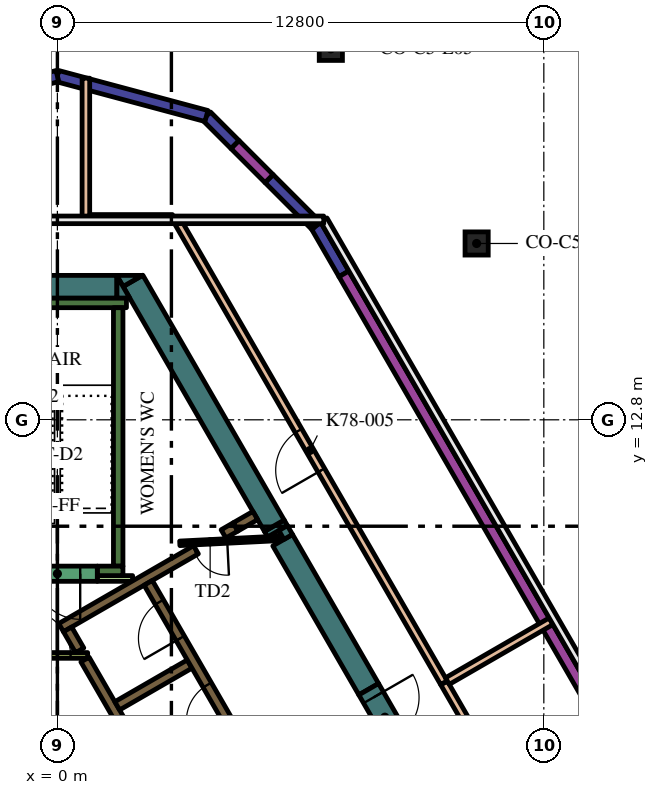
"""IFC4 building model, lengths in metres.
Left out: names, types, materials, properties, quantities, classifications, styles, units other than length and angle.
Written with IfcOpenShell. Run it as: python <this file> out.ifc"""

import sys

from ifc_helpers import new_model, si_unit, direction, frame, frame_2d, origin, origin_2d, place, context, subcontext, project, spatial, polyline, rectangle, hollow_circle, outline, extrude, element, fill, save


model = new_model("IFC4")
c1 = context("Model", 3, precision=1e-05, world=origin(), true_north=direction((0.0, 1.0)))
c2 = subcontext(c1, "Body", "Model", "MODEL_VIEW")
j1 = project(units=[si_unit("LENGTHUNIT", "METRE"), si_unit("PLANEANGLEUNIT", "RADIAN")], contexts=[c1])
p1 = place(None, origin())
s1 = spatial("IfcSite", under=j1, at=p1, CompositionType="ELEMENT")
p2 = place(p1, origin())
s2 = spatial("IfcBuilding", under=s1, at=p2, CompositionType="ELEMENT")
p3 = place(p2, frame((0.0, 0.0, 336.0)))
s3 = spatial("IfcBuildingStorey", under=s2, at=p3, CompositionType="ELEMENT", Elevation=336.0)
for number, where, z_axis, x_axis in (
    (1, (11.032, 17.44, 0.0), (0.0, 0.0, 1.0), (1.0, 0.0, 0.0)),
    (2, (7.195, 22.561, 0.0), (0.0, 0.0, 1.0), (1.0, 0.0, 0.0)),
):
    element("IfcColumn", number, at=place(p3, frame(where, z_axis=z_axis, x_axis=x_axis)), inside=s3, PredefinedType="COLUMN", context=c2, shape_type="SweptSolid", body=[
        extrude(hollow_circle(Radius=0.305, WallThickness=0.025, at=origin_2d()), origin(), (0.0, 0.0, 1.0), 4.2),
    ])
p4 = place(p3, frame((5.709, 10.012, 0.0), z_axis=(0.0, 0.0, 1.0), x_axis=(0.500399834964, -0.865794435861, 0.0)))
e3 = element("IfcWall", 3, at=p4, inside=s3, PredefinedType="SOLIDWALL", context=c2, shape_type="SweptSolid", body=[
    extrude(rectangle(XDim=0.166, YDim=0.6, at=frame_2d((0.083, 0.0))), origin(), (0.0, 0.0, 1.0), 4.2),
])
p5 = place(p3, frame((5.928, 9.633, 0.0), z_axis=(0.0, 0.0, 1.0), x_axis=(0.499983823482, -0.8660347431, 0.0)))
e4 = element("IfcWall", 4, at=p5, inside=s3, PredefinedType="SOLIDWALL", context=c2, shape_type="SweptSolid", body=[
    extrude(rectangle(XDim=4.528, YDim=0.6, at=frame_2d((2.264, 0.0))), origin(), (0.0, 0.0, 1.0), 4.2),
])
p6 = place(p3, origin())
e5 = element("IfcWall", 5, at=p6, inside=s3, PredefinedType="SOLIDWALL", context=c2, shape_type="SweptSolid", body=[
    extrude(outline(polyline([(6.053, 10.016), (6.187, 9.784), (5.961, 9.654), (5.827, 9.886), (6.053, 10.016)])), origin(), (0.0, 0.0, 1.0), 4.2),
])
p7 = place(p3, frame((1.989, 16.456, 0.0), z_axis=(0.0, 0.0, 1.0), x_axis=(0.499990476767, -0.866030901956, 0.0)))
e6 = element("IfcWall", 6, at=p7, inside=s3, PredefinedType="SOLIDWALL", context=c2, shape_type="SweptSolid", body=[
    extrude(rectangle(XDim=7.438, YDim=0.6, at=frame_2d((3.719, 0.0))), origin(), (0.0, 0.0, 1.0), 4.2),
])
e7 = element("IfcWall", 7, at=p6, inside=s3, PredefinedType="SOLIDWALL", context=c2, shape_type="SweptSolid", body=[
    extrude(outline(polyline([(1.559, 16.6), (2.235, 16.6), (1.728, 16.307), (1.559, 16.6)])), origin(), (0.0, 0.0, 1.0), 4.2),
])
p8 = place(p3, frame((-2.258, 16.3, 0.0), z_axis=(0.0, 0.0, 1.0), x_axis=(1.0, 0.0, 0.0)))
e8 = element("IfcWall", 8, at=p8, inside=s3, PredefinedType="SOLIDWALL", context=c2, shape_type="SweptSolid", body=[
    extrude(rectangle(XDim=3.823, YDim=0.6, at=frame_2d((1.912, 0.0))), origin(), (0.0, 0.0, 1.0), 4.2),
])
e9 = element("IfcWall", 9, at=p6, inside=s3, PredefinedType="SOLIDWALL", context=c2, shape_type="SweptSolid", body=[
    extrude(outline(polyline([(1.905, 16.0), (1.567, 16.0), (1.567, 16.585), (1.905, 16.0)])), origin(), (0.0, 0.0, 1.0), 4.2),
])
p9 = place(p3, frame((-1.817, 15.875, 0.0), z_axis=(0.0, 0.0, 1.0), x_axis=(1.0, 0.0, 0.0)))
e10 = element("IfcWall", 10, at=p9, inside=s3, PredefinedType="SOLIDWALL", context=c2, shape_type="SweptSolid", body=[
    extrude(rectangle(XDim=3.634, YDim=0.25, at=frame_2d((1.817, 0.0))), origin(), (0.0, 0.0, 1.0), 4.2),
])
p10 = place(p3, frame((1.6, 8.95, 0.0), z_axis=(0.0, 0.0, 1.0), x_axis=(0.0, 1.0, 0.0)))
e11 = element("IfcWall", 11, at=p10, inside=s3, PredefinedType="SOLIDWALL", context=c2, shape_type="SweptSolid", body=[
    extrude(rectangle(XDim=6.8, YDim=0.25, at=frame_2d((3.4, 0.0))), origin(), (0.0, 0.0, 1.0), 4.2),
])
p11 = place(p3, frame((1.05, 8.825, 0.0), z_axis=(0.0, 0.0, 1.0), x_axis=(1.0, 0.0, 0.0)))
e12 = element("IfcWall", 12, at=p11, inside=s3, PredefinedType="SOLIDWALL", context=c2, shape_type="SweptSolid", body=[
    extrude(rectangle(XDim=0.675, YDim=0.25, at=frame_2d((0.337, 0.0))), origin(), (0.0, 0.0, 1.0), 4.2),
])
p12 = place(p3, frame((3.647, 9.38, 0.0), z_axis=(0.0, 0.0, 1.0), x_axis=(-0.866027868628, -0.499995730742, 0.0)))
e13 = element("IfcWall", 13, at=p12, inside=s3, PredefinedType="SOLIDWALL", context=c2, shape_type="SweptSolid", body=[
    extrude(rectangle(XDim=4.099, YDim=0.25, at=frame_2d((2.049, 0.0))), origin(), (0.0, 0.0, 1.0), 4.2),
])
p13 = place(p3, frame((0.268, 7.285, 0.0), z_axis=(0.0, 0.0, 1.0), x_axis=(0.500098681536, -0.865968422476, 0.0)))
e14 = element("IfcWall", 14, at=p13, inside=s3, PredefinedType="SOLIDWALL", context=c2, shape_type="SweptSolid", body=[
    extrude(rectangle(XDim=0.636, YDim=0.25, at=frame_2d((0.318, 0.0))), origin(), (0.0, 0.0, 1.0), 4.2),
])
p14 = place(p3, frame((5.97, -2.591, 0.0), z_axis=(0.0, 0.0, 1.0), x_axis=(-0.499994469932, 0.866028596547, 0.0)))
e15 = element("IfcWall", 15, at=p14, inside=s3, PredefinedType="SOLIDWALL", context=c2, shape_type="SweptSolid", body=[
    extrude(rectangle(XDim=10.488, YDim=0.25, at=frame_2d((5.244, 0.0))), origin(), (0.0, 0.0, 1.0), 4.2),
])
p15 = place(p3, frame((1.574, 5.274, 0.0), z_axis=(0.0, 0.0, 1.0), x_axis=(0.866028486751, 0.499994660107, 0.0)))
e16 = element("IfcWall", 16, at=p15, inside=s3, PredefinedType="SOLIDWALL", context=c2, shape_type="SweptSolid", body=[
    extrude(rectangle(XDim=2.2, YDim=0.25, at=frame_2d((1.1, 0.0))), origin(), (0.0, 0.0, 1.0), 4.2),
])
p16 = place(p3, frame((4.688, 9.981, 0.0), z_axis=(0.0, 0.0, 1.0), x_axis=(-0.865974312977, -0.500088481434, 0.0)))
e17 = element("IfcWall", 17, at=p16, inside=s3, PredefinedType="SOLIDWALL", context=c2, shape_type="SweptSolid", body=[
    extrude(rectangle(XDim=0.366, YDim=0.25, at=frame_2d((0.183, 0.0))), origin(), (0.0, 0.0, 1.0), 4.2),
])
p17 = place(p3, frame((4.689, 9.982, 0.0), z_axis=(0.0, 0.0, 1.0), x_axis=(0.865947592822, 0.500134748329, 0.0)))
e18 = element("IfcWall", 18, at=p17, inside=s3, PredefinedType="SOLIDWALL", context=c2, shape_type="SweptSolid", body=[
    extrude(rectangle(XDim=0.598, YDim=0.25, at=frame_2d((0.299, 0.0))), origin(), (0.0, 0.0, 1.0), 4.2),
])
p18 = place(p3, frame((1.05, 8.625, 0.0), z_axis=(0.0, 0.0, 1.0), x_axis=(1.0, 0.0, 0.0)))
e19 = element("IfcWall", 19, at=p18, inside=s3, PredefinedType="PARTITIONING", context=c2, shape_type="SweptSolid", body=[
    extrude(rectangle(XDim=0.929, YDim=0.15, at=frame_2d((0.464, 0.0))), origin(), (0.0, 0.0, 1.0), 3.45),
])
p19 = place(p3, frame((8.565, -2.185, 0.0), z_axis=(0.0, 0.0, 1.0), x_axis=(-0.499997954832, 0.866026584559, 0.0)))
e20 = element("IfcWall", 20, at=p19, inside=s3, PredefinedType="SOLIDWALL", context=c2, shape_type="SweptSolid", body=[
    extrude(rectangle(XDim=12.35, YDim=0.25, at=frame_2d((6.175, 0.0))), origin(), (0.0, 0.0, 1.0), 4.2),
])
p20 = place(p19, frame((0.685, 0.0, 0.0)))
e21 = element("IfcOpeningElement", 21, at=p20, cuts=e20, PredefinedType="OPENING", context=c2, shape_type="SweptSolid", body=[
    extrude(rectangle(XDim=0.9, YDim=2.1, at=frame_2d((0.45, 1.05))), frame((0.0, 0.135, 0.0), z_axis=(0.0, -1.0, 0.0), x_axis=(1.0, 0.0, 0.0)), (0.0, 0.0, 1.0), 0.27),
])
p21 = place(p19, frame((3.105, 0.0, 0.0)))
e22 = element("IfcOpeningElement", 22, at=p21, cuts=e20, PredefinedType="OPENING", context=c2, shape_type="SweptSolid", body=[
    extrude(rectangle(XDim=1.1, YDim=2.1, at=frame_2d((0.55, 1.05))), frame((0.0, 0.135, 0.0), z_axis=(0.0, -1.0, 0.0), x_axis=(1.0, 0.0, 0.0)), (0.0, 0.0, 1.0), 0.27),
])
p22 = place(p19, frame((5.625, 0.0, 0.0)))
e23 = element("IfcOpeningElement", 23, at=p22, cuts=e20, PredefinedType="OPENING", context=c2, shape_type="SweptSolid", body=[
    extrude(rectangle(XDim=1.1, YDim=2.1, at=frame_2d((0.55, 1.05))), frame((0.0, 0.135, 0.0), z_axis=(0.0, -1.0, 0.0), x_axis=(1.0, 0.0, 0.0)), (0.0, 0.0, 1.0), 0.27),
])
p23 = place(p19, frame((8.145, 0.0, 0.0)))
e24 = element("IfcOpeningElement", 24, at=p23, cuts=e20, PredefinedType="OPENING", context=c2, shape_type="SweptSolid", body=[
    extrude(rectangle(XDim=1.1, YDim=2.1, at=frame_2d((0.55, 1.05))), frame((0.0, 0.135, 0.0), z_axis=(0.0, -1.0, 0.0), x_axis=(1.0, 0.0, 0.0)), (0.0, 0.0, 1.0), 0.27),
])
p24 = place(p19, frame((10.665, 0.0, 0.0)))
e25 = element("IfcOpeningElement", 25, at=p24, cuts=e20, PredefinedType="OPENING", context=c2, shape_type="SweptSolid", body=[
    extrude(rectangle(XDim=1.1, YDim=2.1, at=frame_2d((0.55, 1.05))), frame((0.0, 0.135, 0.0), z_axis=(0.0, -1.0, 0.0), x_axis=(1.0, 0.0, 0.0)), (0.0, 0.0, 1.0), 0.27),
])
p25 = place(p3, frame((1.05, 8.75, 0.0), z_axis=(0.0, 0.0, 1.0), x_axis=(-1.0, 0.0, 0.0)))
e26 = element("IfcWall", 26, at=p25, inside=s3, PredefinedType="SOLIDWALL", context=c2, shape_type="SweptSolid", body=[
    extrude(rectangle(XDim=2.1, YDim=0.4, at=frame_2d((1.05, 0.0))), origin(), (0.0, 0.0, 1.0), 4.2),
])
p26 = place(p25, frame((0.45, 0.0, 0.0)))
e27 = element("IfcOpeningElement", 27, at=p26, cuts=e26, PredefinedType="OPENING", context=c2, shape_type="SweptSolid", body=[
    extrude(rectangle(XDim=1.2, YDim=2.1, at=frame_2d((0.6, 1.05))), frame((0.0, 0.21, 0.0), z_axis=(0.0, -1.0, 0.0), x_axis=(1.0, 0.0, 0.0)), (0.0, 0.0, 1.0), 0.42),
])
p27 = place(p3, frame((5.917, 9.684, 0.0), z_axis=(0.0, 0.0, 1.0), x_axis=(-0.998758194515, -0.049820366212, 0.0)))
e28 = element("IfcWall", 28, at=p27, inside=s3, PredefinedType="PARTITIONING", context=c2, shape_type="SweptSolid", body=[
    extrude(rectangle(XDim=2.7, YDim=0.12, at=frame_2d((1.35, 0.0))), origin(), (0.0, 0.0, 1.0), 3.45),
])
p28 = place(p27, frame((1.45, 0.0, 0.0)))
e29 = element("IfcOpeningElement", 29, at=p28, cuts=e28, PredefinedType="OPENING", context=c2, shape_type="SweptSolid", body=[
    extrude(rectangle(XDim=0.9, YDim=2.1, at=frame_2d((0.45, 1.05))), frame((0.0, 0.07, 0.0), z_axis=(0.0, -1.0, 0.0), x_axis=(1.0, 0.0, 0.0)), (0.0, 0.0, 1.0), 0.14),
])
p29 = place(p3, frame((-1.303, 6.6, 0.0), z_axis=(0.0, 0.0, 1.0), x_axis=(1.0, 0.0, 0.0)))
e30 = element("IfcWall", 30, at=p29, inside=s3, PredefinedType="PARTITIONING", context=c2, shape_type="SweptSolid", body=[
    extrude(rectangle(XDim=2.1, YDim=0.15, at=frame_2d((1.05, 0.0))), origin(), (0.0, 0.0, 1.0), 4.2),
])
p30 = place(p29, frame((0.45, 0.0, 0.0)))
e31 = element("IfcOpeningElement", 31, at=p30, cuts=e30, PredefinedType="OPENING", context=c2, shape_type="SweptSolid", body=[
    extrude(rectangle(XDim=1.2, YDim=2.1, at=frame_2d((0.6, 1.05))), frame((0.0, 0.085, 0.0), z_axis=(0.0, -1.0, 0.0), x_axis=(1.0, 0.0, 0.0)), (0.0, 0.0, 1.0), 0.17),
])
p31 = place(p3, frame((8.192, 5.711, 0.0), z_axis=(0.0, 0.0, 1.0), x_axis=(0.500062241894, -0.865989465428, 0.0)))
e32 = element("IfcWall", 32, at=p31, inside=s3, PredefinedType="SOLIDWALL", context=c2, shape_type="SweptSolid", body=[
    extrude(rectangle(XDim=1.7, YDim=0.6, at=frame_2d((0.85, 0.0))), origin(), (0.0, 0.0, 1.0), 4.2),
])
p32 = place(p31, frame((0.25, 0.0, 0.0)))
e33 = element("IfcOpeningElement", 33, at=p32, cuts=e32, PredefinedType="OPENING", context=c2, shape_type="SweptSolid", body=[
    extrude(rectangle(XDim=1.2, YDim=2.1, at=frame_2d((0.6, 1.05))), frame((0.0, 0.31, 0.0), z_axis=(0.0, -1.0, 0.0), x_axis=(1.0, 0.0, 0.0)), (0.0, 0.0, 1.0), 0.62),
])
p33 = place(p3, frame((17.234, -6.35, 0.0), z_axis=(0.0, 0.0, 1.0), x_axis=(-0.499989432091, 0.866031505083, 0.0)))
e34 = element("IfcWall", 34, at=p33, inside=s3, PredefinedType="PARTITIONING", context=c2, shape_type="SweptSolid", body=[
    extrude(rectangle(XDim=14.116, YDim=0.2, at=frame_2d((7.058, 0.0))), origin(), (0.0, 0.0, 1.0), 3.45),
])
p34 = place(p33, frame((6.458, 0.0, 0.0)))
e35 = element("IfcOpeningElement", 35, at=p34, cuts=e34, PredefinedType="OPENING", context=c2, shape_type="SweptSolid", body=[
    extrude(rectangle(XDim=1.2, YDim=2.1, at=frame_2d((0.6, 1.05))), frame((0.0, 0.11, 0.0), z_axis=(0.0, -1.0, 0.0), x_axis=(1.0, 0.0, 0.0)), (0.0, 0.0, 1.0), 0.22),
])
p35 = place(p3, frame((10.171, 5.884, 0.0), z_axis=(0.0, 0.0, 1.0), x_axis=(-0.499999609035, 0.866025629508, 0.0)))
e36 = element("IfcWall", 36, at=p35, inside=s3, PredefinedType="PARTITIONING", context=c2, shape_type="SweptSolid", body=[
    extrude(rectangle(XDim=14.106, YDim=0.2, at=frame_2d((7.053, 0.0))), origin(), (0.0, 0.0, 1.0), 3.45),
])
p36 = place(p35, frame((6.453, 0.0, 0.0)))
e37 = element("IfcOpeningElement", 37, at=p36, cuts=e36, PredefinedType="OPENING", context=c2, shape_type="SweptSolid", body=[
    extrude(rectangle(XDim=1.2, YDim=2.1, at=frame_2d((0.6, 1.05))), frame((0.0, 0.11, 0.0), z_axis=(0.0, -1.0, 0.0), x_axis=(1.0, 0.0, 0.0)), (0.0, 0.0, 1.0), 0.22),
])
p37 = place(p3, frame((0.75, 21.789, 0.0), z_axis=(0.0, 0.0, 1.0), x_axis=(0.0, -1.0, 0.0)))
e38 = element("IfcWall", 38, at=p37, inside=s3, PredefinedType="PARTITIONING", context=c2, shape_type="SweptSolid", body=[
    extrude(rectangle(XDim=3.688, YDim=0.2, at=frame_2d((1.844, 0.0))), origin(), (0.0, 0.0, 1.0), 3.45),
])
p38 = place(p3, frame((10.262, 5.925, 0.0), z_axis=(0.0, 0.0, 1.0), x_axis=(0.866035871367, 0.499981869177, 0.0)))
e39 = element("IfcWall", 39, at=p38, inside=s3, PredefinedType="PARTITIONING", context=c2, shape_type="SweptSolid", body=[
    extrude(rectangle(XDim=3.15, YDim=0.2, at=frame_2d((1.575, 0.0))), origin(), (0.0, 0.0, 1.0), 3.45),
])
p39 = place(p3, frame((0.85, 18.1, 0.0), z_axis=(0.0, 0.0, 1.0), x_axis=(1.0, 0.0, 0.0)))
e40 = element("IfcWall", 40, at=p39, inside=s3, PredefinedType="PARTITIONING", context=c2, shape_type="SweptSolid", body=[
    extrude(rectangle(XDim=2.177, YDim=0.2, at=frame_2d((1.089, 0.0))), origin(), (0.0, 0.0, 1.0), 3.45),
])
p40 = place(p3, frame((18.181, -1.79, 0.0), z_axis=(0.0, 0.0, 1.0), x_axis=(-0.500002158106, 0.866024157798, 0.0)))
e41 = element("IfcWall", 41, at=p40, inside=s3, PredefinedType="SOLIDWALL", context=c2, shape_type="SweptSolid", body=[
    extrude(rectangle(XDim=21.282, YDim=0.3, at=frame_2d((10.641, 0.0))), origin(), (0.0, 0.0, 1.0), 3.45),
])
p41 = place(p3, frame((7.54, 16.64, 0.0), z_axis=(0.0, 0.0, 1.0), x_axis=(-0.499977492351, 0.866038398192, 0.0)))
e42 = element("IfcWall", 42, at=p41, inside=s3, PredefinedType="SOLIDWALL", context=c2, shape_type="SweptSolid", body=[
    extrude(rectangle(XDim=1.464, YDim=0.3, at=frame_2d((0.732, 0.0))), origin(), (0.0, 0.0, 1.0), 3.95),
])
p42 = place(p3, frame((6.808, 17.908, 0.0), z_axis=(0.0, 0.0, 1.0), x_axis=(-0.707106781187, 0.707106781187, 0.0)))
e43 = element("IfcWall", 43, at=p42, inside=s3, PredefinedType="SOLIDWALL", context=c2, shape_type="SweptSolid", body=[
    extrude(rectangle(XDim=1.752, YDim=0.3, at=frame_2d((0.876, 0.0))), origin(), (0.0, 0.0, 1.0), 3.95),
])
p43 = place(p3, frame((5.569, 19.147, 0.0), z_axis=(0.0, 0.0, 1.0), x_axis=(-0.707106781187, 0.707106781187, 0.0)))
e44 = element("IfcWall", 44, at=p43, inside=s3, PredefinedType="SOLIDWALL", context=c2, shape_type="SweptSolid", body=[
    extrude(rectangle(XDim=1.264, YDim=0.3, at=frame_2d((0.632, 0.0))), origin(), (0.0, 0.0, 1.0), 3.45),
])
p44 = place(p3, frame((4.675, 20.041, 0.0), z_axis=(0.0, 0.0, 1.0), x_axis=(-0.707106781187, 0.707106781187, 0.0)))
e45 = element("IfcWall", 45, at=p44, inside=s3, PredefinedType="SOLIDWALL", context=c2, shape_type="SweptSolid", body=[
    extrude(rectangle(XDim=1.065, YDim=0.3, at=frame_2d((0.532, 0.0))), origin(), (0.0, 0.0, 1.0), 3.95),
])
for number, where, z_axis, x_axis in (
    (46, (3.922, 20.794, 0.0), (0.0, 0.0, 1.0), (-0.966, 0.259, 0.0)),
    (47, (0.0, 21.845, 0.0), (0.0, 0.0, 1.0), (-0.966, -0.259, 0.0)),
):
    element("IfcWall", number, at=place(p3, frame(where, z_axis=z_axis, x_axis=x_axis)), inside=s3, PredefinedType="SOLIDWALL", context=c2, shape_type="SweptSolid", body=[
        extrude(rectangle(XDim=4.061, YDim=0.3, at=frame_2d((2.03, 0.0))), origin(), (0.0, 0.0, 1.0), 3.95),
    ])
p45 = place(p23, origin())
e48 = element("IfcDoor", 48, at=p45, inside=s3, OperationType="DOUBLE_DOOR_SLIDING", PredefinedType="DOOR", context=c2, shape_type="SweptSolid", body=[
    extrude(rectangle(XDim=1.1, YDim=2.1, at=frame_2d((0.55, 1.05))), frame((0.0, 0.025, 0.0), z_axis=(0.0, -1.0, 0.0), x_axis=(1.0, 0.0, 0.0)), (0.0, 0.0, 1.0), 0.05),
])
fill(e24, e48)
p46 = place(p24, origin())
e49 = element("IfcDoor", 49, at=p46, inside=s3, OperationType="DOUBLE_DOOR_SLIDING", PredefinedType="DOOR", context=c2, shape_type="SweptSolid", body=[
    extrude(rectangle(XDim=1.1, YDim=2.1, at=frame_2d((0.55, 1.05))), frame((0.0, 0.025, 0.0), z_axis=(0.0, -1.0, 0.0), x_axis=(1.0, 0.0, 0.0)), (0.0, 0.0, 1.0), 0.05),
])
fill(e25, e49)
p47 = place(p26, origin())
e50 = element("IfcDoor", 50, at=p47, inside=s3, OperationType="SINGLE_SWING_LEFT", PredefinedType="DOOR", context=c2, shape_type="SweptSolid", body=[
    extrude(rectangle(XDim=1.2, YDim=2.1, at=frame_2d((0.6, 1.05))), frame((0.0, 0.025, 0.0), z_axis=(0.0, -1.0, 0.0), x_axis=(1.0, 0.0, 0.0)), (0.0, 0.0, 1.0), 0.05),
])
fill(e27, e50)
p48 = place(p28, origin())
e51 = element("IfcDoor", 51, at=p48, inside=s3, OperationType="SINGLE_SWING_LEFT", PredefinedType="DOOR", context=c2, shape_type="SweptSolid", body=[
    extrude(rectangle(XDim=0.9, YDim=2.1, at=frame_2d((0.45, 1.05))), frame((0.0, 0.025, 0.0), z_axis=(0.0, -1.0, 0.0), x_axis=(1.0, 0.0, 0.0)), (0.0, 0.0, 1.0), 0.05),
])
fill(e29, e51)
p49 = place(p30, origin())
e52 = element("IfcDoor", 52, at=p49, inside=s3, OperationType="SINGLE_SWING_LEFT", PredefinedType="DOOR", context=c2, shape_type="SweptSolid", body=[
    extrude(rectangle(XDim=1.2, YDim=2.1, at=frame_2d((0.6, 1.05))), frame((0.0, 0.025, 0.0), z_axis=(0.0, -1.0, 0.0), x_axis=(1.0, 0.0, 0.0)), (0.0, 0.0, 1.0), 0.05),
])
fill(e31, e52)
p50 = place(p32, origin())
e53 = element("IfcDoor", 53, at=p50, inside=s3, OperationType="SINGLE_SWING_LEFT", PredefinedType="DOOR", context=c2, shape_type="SweptSolid", body=[
    extrude(rectangle(XDim=1.2, YDim=2.1, at=frame_2d((0.6, 1.05))), frame((0.0, 0.025, 0.0), z_axis=(0.0, -1.0, 0.0), x_axis=(1.0, 0.0, 0.0)), (0.0, 0.0, 1.0), 0.05),
])
fill(e33, e53)
p51 = place(p36, origin())
e54 = element("IfcDoor", 54, at=p51, inside=s3, OperationType="SINGLE_SWING_RIGHT", PredefinedType="DOOR", context=c2, shape_type="SweptSolid", body=[
    extrude(rectangle(XDim=1.2, YDim=2.1, at=frame_2d((0.6, 1.05))), frame((0.0, 0.025, 0.0), z_axis=(0.0, -1.0, 0.0), x_axis=(1.0, 0.0, 0.0)), (0.0, 0.0, 1.0), 0.05),
])
fill(e37, e54)
save(model, sys.argv[1])
